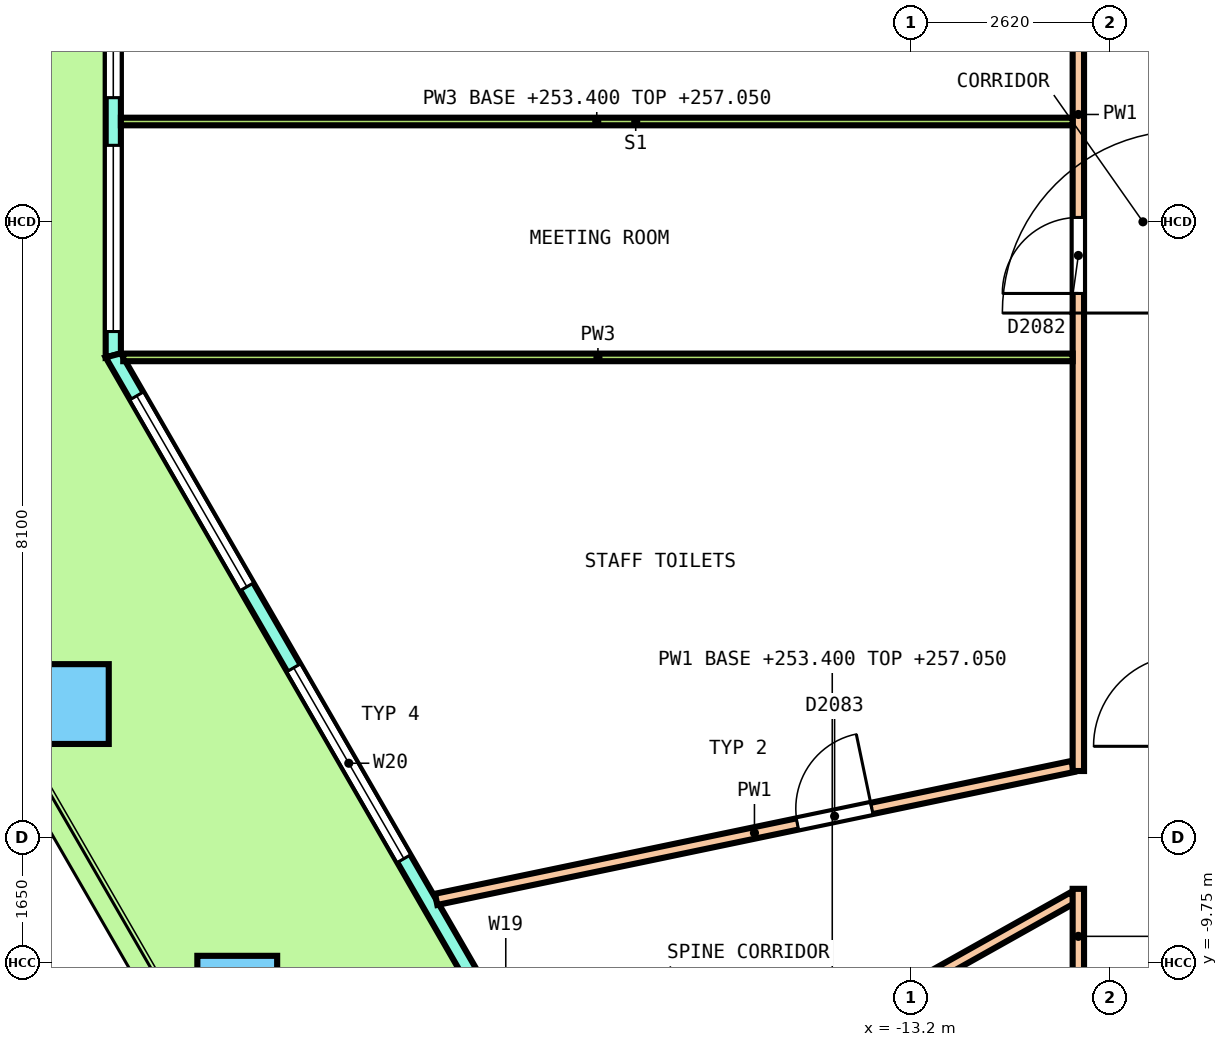
"""IFC4 building model, lengths in metres.
Left out: names, types, materials, properties, quantities, classifications, styles, units other than length and angle.
Written with IfcOpenShell. Run it as: python <this file> out.ifc"""

import sys

from ifc_helpers import new_model, si_unit, direction, frame, frame_2d, origin, origin_2d, place, context, subcontext, project, spatial, polyline, rectangle, outline, extrude, element, fill, save


model = new_model("IFC4")
c1 = context("Model", 3, precision=1e-05, world=origin(), true_north=direction((0.0, 1.0)))
c2 = subcontext(c1, "Body", "Model", "MODEL_VIEW")
j1 = project(units=[si_unit("LENGTHUNIT", "METRE"), si_unit("PLANEANGLEUNIT", "RADIAN")], contexts=[c1])
p1 = place(None, origin())
s1 = spatial("IfcSite", under=j1, at=p1, CompositionType="ELEMENT")
p2 = place(p1, origin())
s2 = spatial("IfcBuilding", under=s1, at=p2, CompositionType="ELEMENT")
p3 = place(p2, frame((0.0, 0.0, 253.4)))
s3 = spatial("IfcBuildingStorey", under=s2, at=p3, CompositionType="ELEMENT", Elevation=253.4)
p4 = place(p3, frame((-24.281, -6.344, 0.0), z_axis=(0.11141157775, -0.193008789623, 0.974851305313), x_axis=(0.487356172792, -0.844286105721, -0.222856304663)))
e1 = element("IfcColumn", 1, at=p4, inside=s3, PredefinedType="COLUMN", context=c2, shape_type="SweptSolid", body=[
    extrude(rectangle(XDim=1.05, YDim=1.05, at=origin_2d()), origin(), (0.0, 0.0, 1.0), 3.734),
])
p5 = place(p3, frame((-22.065, -10.181, 0.0), z_axis=(0.037985280426, -0.065738610314, 0.997113611172), x_axis=(0.49877068165, -0.863402201049, -0.075923951094)))
e2 = element("IfcColumn", 2, at=p5, inside=s3, PredefinedType="COLUMN", context=c2, shape_type="SweptSolid", body=[
    extrude(rectangle(XDim=1.05, YDim=1.05, at=origin_2d()), origin(), (0.0, 0.0, 1.0), 3.651),
])
p6 = place(p3, frame((-23.696, 4.396, 0.0), z_axis=(0.0, 0.0, 1.0), x_axis=(0.0, -1.0, 0.0)))
e3 = element("IfcWall", 3, at=p6, inside=s3, PredefinedType="SOLIDWALL", context=c2, shape_type="SweptSolid", body=[
    extrude(outline(polyline([(-0.027, -0.1), (1.008, -0.1), (2.042, -0.1), (3.077, -0.1), (4.111, -0.1), (5.146, -0.1), (6.18, -0.1), (6.126, 0.1), (5.11, 0.1), (4.093, 0.1), (3.077, 0.1), (2.06, 0.1), (1.043, 0.1), (0.027, 0.1), (-0.027, -0.1)])), origin(), (0.0, 0.0, 1.0), 3.7),
])
p7 = place(p6, frame((0.313, 0.0, 0.1)))
e4 = element("IfcOpeningElement", 4, at=p7, cuts=e3, PredefinedType="OPENING", context=c2, shape_type="SweptSolid", body=[
    extrude(rectangle(XDim=2.45, YDim=2.65, at=frame_2d((1.225, 1.325))), frame((0.0, 0.11, 0.0), z_axis=(0.0, -1.0, 0.0), x_axis=(1.0, 0.0, 0.0)), (0.0, 0.0, 1.0), 0.22),
])
p8 = place(p6, frame((3.39, 0.0, 0.1)))
e5 = element("IfcOpeningElement", 5, at=p8, cuts=e3, PredefinedType="OPENING", context=c2, shape_type="SweptSolid", body=[
    extrude(rectangle(XDim=2.45, YDim=2.65, at=frame_2d((1.225, 1.325))), frame((0.0, 0.11, 0.0), z_axis=(0.0, -1.0, 0.0), x_axis=(1.0, 0.0, 0.0)), (0.0, 0.0, 1.0), 0.22),
])
p9 = place(p3, frame((-23.696, -1.757, 0.0), z_axis=(0.0, 0.0, 1.0), x_axis=(0.500000087574, -0.866025353224, 0.0)))
e6 = element("IfcWall", 6, at=p9, inside=s3, PredefinedType="SOLIDWALL", context=c2, shape_type="SweptSolid", body=[
    extrude(outline(polyline([(-0.027, -0.1), (1.009, -0.1), (2.044, -0.1), (3.079, -0.1), (4.115, -0.1), (5.15, -0.1), (6.185, -0.1), (7.221, -0.1), (8.256, -0.1), (9.292, -0.1), (10.327, -0.1), (11.362, -0.1), (12.398, -0.1), (13.433, -0.1), (14.469, -0.1), (15.504, -0.1), (16.539, -0.1), (17.574, -0.1), (18.61, -0.1), (19.645, -0.1), (20.681, -0.1), (20.627, 0.1), (19.597, 0.1), (18.567, 0.1), (17.537, 0.1), (16.507, 0.1), (15.477, 0.1), (14.447, 0.1), (13.417, 0.1), (12.387, 0.1), (11.357, 0.1), (10.327, 0.1), (9.297, 0.1), (8.267, 0.1), (7.237, 0.1), (6.207, 0.1), (5.177, 0.1), (4.147, 0.1), (3.117, 0.1), (2.087, 0.1), (1.057, 0.1), (0.027, 0.1), (-0.027, -0.1)])), origin(), (0.0, 0.0, 1.0), 3.7),
])
p10 = place(p9, frame((0.615, 0.0, 0.1)))
e7 = element("IfcOpeningElement", 7, at=p10, cuts=e6, PredefinedType="OPENING", context=c2, shape_type="SweptSolid", body=[
    extrude(rectangle(XDim=2.9, YDim=2.65, at=frame_2d((1.45, 1.325))), frame((0.0, 0.11, 0.0), z_axis=(0.0, -1.0, 0.0), x_axis=(1.0, 0.0, 0.0)), (0.0, 0.0, 1.0), 0.22),
])
p11 = place(p9, frame((4.746, 0.0, 0.1)))
e8 = element("IfcOpeningElement", 8, at=p11, cuts=e6, PredefinedType="OPENING", context=c2, shape_type="SweptSolid", body=[
    extrude(rectangle(XDim=2.9, YDim=2.65, at=frame_2d((1.45, 1.325))), frame((0.0, 0.11, 0.0), z_axis=(0.0, -1.0, 0.0), x_axis=(1.0, 0.0, 0.0)), (0.0, 0.0, 1.0), 0.22),
])
p12 = place(p9, frame((9.427, 0.0, 0.0)))
e9 = element("IfcOpeningElement", 9, at=p12, cuts=e6, PredefinedType="OPENING", context=c2, shape_type="SweptSolid", body=[
    extrude(rectangle(XDim=1.8, YDim=2.4, at=frame_2d((0.9, 1.2))), frame((0.0, 0.11, 0.0), z_axis=(0.0, -1.0, 0.0), x_axis=(1.0, 0.0, 0.0)), (0.0, 0.0, 1.0), 0.22),
])
p13 = place(p9, frame((9.427, 0.0, 2.55)))
e10 = element("IfcOpeningElement", 10, at=p13, cuts=e6, PredefinedType="OPENING", context=c2, shape_type="SweptSolid", body=[
    extrude(rectangle(XDim=1.8, YDim=0.2, at=frame_2d((0.9, 0.1))), frame((0.0, 0.11, 0.0), z_axis=(0.0, -1.0, 0.0), x_axis=(1.0, 0.0, 0.0)), (0.0, 0.0, 1.0), 0.22),
])
p14 = place(p9, frame((13.008, 0.0, 0.1)))
e11 = element("IfcOpeningElement", 11, at=p14, cuts=e6, PredefinedType="OPENING", context=c2, shape_type="SweptSolid", body=[
    extrude(rectangle(XDim=2.9, YDim=2.65, at=frame_2d((1.45, 1.325))), frame((0.0, 0.11, 0.0), z_axis=(0.0, -1.0, 0.0), x_axis=(1.0, 0.0, 0.0)), (0.0, 0.0, 1.0), 0.22),
])
p15 = place(p9, frame((17.139, 0.0, 0.1)))
e12 = element("IfcOpeningElement", 12, at=p15, cuts=e6, PredefinedType="OPENING", context=c2, shape_type="SweptSolid", body=[
    extrude(rectangle(XDim=2.9, YDim=2.65, at=frame_2d((1.45, 1.325))), frame((0.0, 0.11, 0.0), z_axis=(0.0, -1.0, 0.0), x_axis=(1.0, 0.0, 0.0)), (0.0, 0.0, 1.0), 0.22),
])
p16 = place(p3, frame((-19.449, -8.914, 0.0), z_axis=(0.0, 0.0, 1.0), x_axis=(0.978899865728, 0.204340531657, 0.0)))
e13 = element("IfcWall", 13, at=p16, inside=s3, PredefinedType="PARTITIONING", context=c2, shape_type="SweptSolid", body=[
    extrude(rectangle(XDim=8.556, YDim=0.15, at=frame_2d((4.278, 0.0))), origin(), (0.0, 0.0, 1.0), 2.8),
])
p17 = place(p16, frame((4.855, 0.0, 0.0)))
e14 = element("IfcOpeningElement", 14, at=p17, cuts=e13, PredefinedType="OPENING", context=c2, shape_type="SweptSolid", body=[
    extrude(rectangle(XDim=1.0, YDim=2.1, at=frame_2d((0.5, 1.05))), frame((0.0, 0.085, 0.0), z_axis=(0.0, -1.0, 0.0), x_axis=(1.0, 0.0, 0.0)), (0.0, 0.0, 1.0), 0.17),
])
p18 = place(p3, frame((-17.41, -12.446, 0.0), z_axis=(0.0, 0.0, 1.0), x_axis=(0.872150376128, 0.489237898592, 0.0)))
e15 = element("IfcWall", 15, at=p18, inside=s3, PredefinedType="PARTITIONING", context=c2, shape_type="SweptSolid", body=[
    extrude(rectangle(XDim=7.274, YDim=0.15, at=frame_2d((3.637, 0.0))), origin(), (0.0, 0.0, 1.0), 3.65),
])
p19 = place(p18, frame((1.762, 0.0, 0.0)))
e16 = element("IfcOpeningElement", 16, at=p19, cuts=e15, PredefinedType="OPENING", context=c2, shape_type="SweptSolid", body=[
    extrude(rectangle(XDim=1.0, YDim=2.1, at=frame_2d((0.5, 1.05))), frame((0.0, 0.085, 0.0), z_axis=(0.0, -1.0, 0.0), x_axis=(1.0, 0.0, 0.0)), (0.0, 0.0, 1.0), 0.17),
])
p20 = place(p3, frame((-11.0, -10.025, 0.0), z_axis=(0.0, 0.0, 1.0), x_axis=(0.0, 1.0, 0.0)))
e17 = element("IfcWall", 17, at=p20, inside=s3, PredefinedType="PARTITIONING", context=c2, shape_type="SweptSolid", body=[
    extrude(rectangle(XDim=1.25, YDim=0.15, at=frame_2d((0.625, 0.0))), origin(), (0.0, 0.0, 1.0), 3.65),
])
p21 = place(p3, frame((-11.0, -7.225, 0.0), z_axis=(0.0, 0.0, 1.0), x_axis=(0.0, 1.0, 0.0)))
e18 = element("IfcWall", 18, at=p21, inside=s3, PredefinedType="PARTITIONING", context=c2, shape_type="SweptSolid", body=[
    extrude(rectangle(XDim=17.275, YDim=0.15, at=frame_2d((8.638, 0.0))), origin(), (0.0, 0.0, 1.0), 2.8),
])
p22 = place(p21, frame((15.679, 0.0, 0.0)))
e19 = element("IfcOpeningElement", 19, at=p22, cuts=e18, PredefinedType="OPENING", context=c2, shape_type="SweptSolid", body=[
    extrude(rectangle(XDim=1.0, YDim=2.1, at=frame_2d((0.5, 1.05))), frame((0.0, 0.085, 0.0), z_axis=(0.0, -1.0, 0.0), x_axis=(1.0, 0.0, 0.0)), (0.0, 0.0, 1.0), 0.17),
])
p23 = place(p21, frame((12.381, 0.0, 0.0)))
e20 = element("IfcOpeningElement", 20, at=p23, cuts=e18, PredefinedType="OPENING", context=c2, shape_type="SweptSolid", body=[
    extrude(rectangle(XDim=1.0, YDim=2.1, at=frame_2d((0.5, 1.05))), frame((0.0, 0.085, 0.0), z_axis=(0.0, -1.0, 0.0), x_axis=(1.0, 0.0, 0.0)), (0.0, 0.0, 1.0), 0.17),
])
p24 = place(p21, frame((9.947, 0.0, 0.0)))
e21 = element("IfcOpeningElement", 21, at=p24, cuts=e18, PredefinedType="OPENING", context=c2, shape_type="SweptSolid", body=[
    extrude(rectangle(XDim=1.0, YDim=2.1, at=frame_2d((0.5, 1.05))), frame((0.0, 0.085, 0.0), z_axis=(0.0, -1.0, 0.0), x_axis=(1.0, 0.0, 0.0)), (0.0, 0.0, 1.0), 0.17),
])
p25 = place(p21, frame((6.283, 0.0, 0.0)))
e22 = element("IfcOpeningElement", 22, at=p25, cuts=e18, PredefinedType="OPENING", context=c2, shape_type="SweptSolid", body=[
    extrude(rectangle(XDim=1.0, YDim=2.1, at=frame_2d((0.5, 1.05))), frame((0.0, 0.085, 0.0), z_axis=(0.0, -1.0, 0.0), x_axis=(1.0, 0.0, 0.0)), (0.0, 0.0, 1.0), 0.17),
])
p26 = place(p3, frame((-23.596, 1.32, 0.0), z_axis=(0.0, 0.0, 1.0), x_axis=(1.0, 0.0, 0.0)))
e23 = element("IfcWall", 23, at=p26, inside=s3, PredefinedType="PARTITIONING", context=c2, shape_type="SweptSolid", body=[
    extrude(rectangle(XDim=12.521, YDim=0.1, at=frame_2d((6.261, 0.0))), origin(), (0.0, 0.0, 1.0), 3.65),
])
p27 = place(p3, frame((-23.565, -1.783, 0.0), z_axis=(0.0, 0.0, 1.0), x_axis=(1.0, 0.0, 0.0)))
e24 = element("IfcWall", 24, at=p27, inside=s3, PredefinedType="PARTITIONING", context=c2, shape_type="SweptSolid", body=[
    extrude(rectangle(XDim=12.49, YDim=0.1, at=frame_2d((6.245, 0.0))), origin(), (0.0, 0.0, 1.0), 2.8),
])
p28 = place(p7, origin())
e25 = element("IfcWindow", 25, at=p28, inside=s3, PartitioningType="SINGLE_PANEL", PredefinedType="WINDOW", context=c2, shape_type="SweptSolid", body=[
    extrude(rectangle(XDim=2.45, YDim=2.65, at=frame_2d((1.225, 1.325))), frame((0.0, 0.03, 0.0), z_axis=(0.0, -1.0, 0.0), x_axis=(1.0, 0.0, 0.0)), (0.0, 0.0, 1.0), 0.06),
])
fill(e4, e25)
p29 = place(p8, origin())
e26 = element("IfcWindow", 26, at=p29, inside=s3, PartitioningType="SINGLE_PANEL", PredefinedType="WINDOW", context=c2, shape_type="SweptSolid", body=[
    extrude(rectangle(XDim=2.45, YDim=2.65, at=frame_2d((1.225, 1.325))), frame((0.0, 0.03, 0.0), z_axis=(0.0, -1.0, 0.0), x_axis=(1.0, 0.0, 0.0)), (0.0, 0.0, 1.0), 0.06),
])
fill(e5, e26)
p30 = place(p10, origin())
e27 = element("IfcWindow", 27, at=p30, inside=s3, PartitioningType="SINGLE_PANEL", PredefinedType="WINDOW", context=c2, shape_type="SweptSolid", body=[
    extrude(rectangle(XDim=2.9, YDim=2.65, at=frame_2d((1.45, 1.325))), frame((0.0, 0.03, 0.0), z_axis=(0.0, -1.0, 0.0), x_axis=(1.0, 0.0, 0.0)), (0.0, 0.0, 1.0), 0.06),
])
fill(e7, e27)
p31 = place(p11, origin())
e28 = element("IfcWindow", 28, at=p31, inside=s3, PartitioningType="SINGLE_PANEL", PredefinedType="WINDOW", context=c2, shape_type="SweptSolid", body=[
    extrude(rectangle(XDim=2.9, YDim=2.65, at=frame_2d((1.45, 1.325))), frame((0.0, 0.03, 0.0), z_axis=(0.0, -1.0, 0.0), x_axis=(1.0, 0.0, 0.0)), (0.0, 0.0, 1.0), 0.06),
])
fill(e8, e28)
p32 = place(p25, origin())
e29 = element("IfcDoor", 29, at=p32, inside=s3, OperationType="SINGLE_SWING_RIGHT", PredefinedType="DOOR", context=c2, shape_type="SweptSolid", body=[
    extrude(rectangle(XDim=1.0, YDim=2.1, at=frame_2d((0.5, 1.05))), frame((0.0, 0.025, 0.0), z_axis=(0.0, -1.0, 0.0), x_axis=(1.0, 0.0, 0.0)), (0.0, 0.0, 1.0), 0.05),
])
fill(e22, e29)
p33 = place(p17, origin())
e30 = element("IfcDoor", 30, at=p33, inside=s3, OperationType="SINGLE_SWING_RIGHT", PredefinedType="DOOR", context=c2, shape_type="SweptSolid", body=[
    extrude(rectangle(XDim=1.0, YDim=2.1, at=frame_2d((0.5, 1.05))), frame((0.0, 0.025, 0.0), z_axis=(0.0, -1.0, 0.0), x_axis=(1.0, 0.0, 0.0)), (0.0, 0.0, 1.0), 0.05),
])
fill(e14, e30)
save(model, sys.argv[1])
